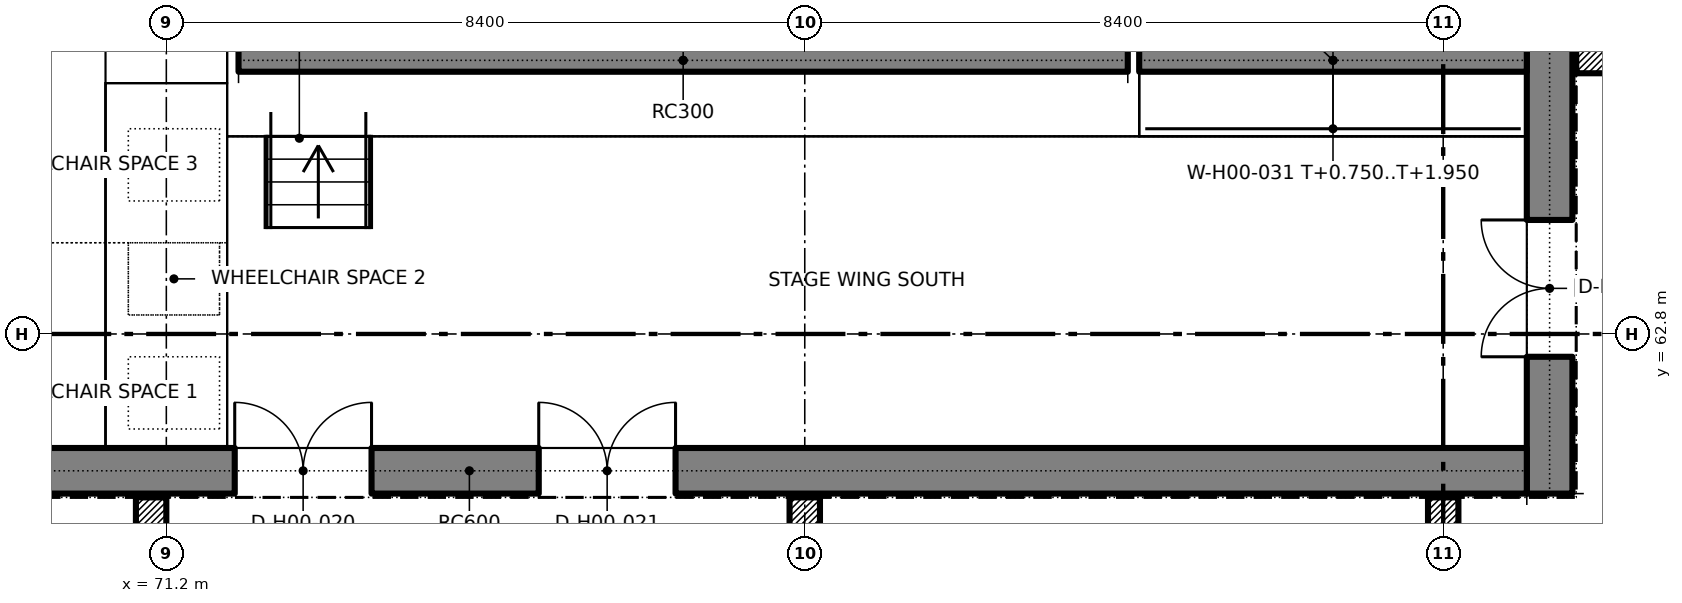
"""IFC4 building model, lengths in metres.
Left out: names, types, materials, properties, quantities, classifications, styles, units other than length and angle.
Written with IfcOpenShell. Run it as: python <this file> out.ifc"""

import sys

from ifc_helpers import new_model, si_unit, direction, frame, frame_2d, origin, origin_2d, place, context, subcontext, project, spatial, polyline, rectangle, outline, extrude, element, fill, save


model = new_model("IFC4")
c1 = context("Model", 3, precision=1e-05, world=origin(), true_north=direction((0.0, 1.0)))
c2 = subcontext(c1, "Body", "Model", "MODEL_VIEW")
j1 = project(units=[si_unit("LENGTHUNIT", "METRE"), si_unit("PLANEANGLEUNIT", "RADIAN")], contexts=[c1])
p1 = place(None, origin())
s1 = spatial("IfcSite", under=j1, at=p1, CompositionType="ELEMENT")
p2 = place(p1, origin())
s2 = spatial("IfcBuilding", under=s1, at=p2, CompositionType="ELEMENT")
p3 = place(p2, origin())
s3 = spatial("IfcBuildingStorey", under=s2, at=p3, CompositionType="ELEMENT", Elevation=0.0)
p4 = place(p3, frame((89.4, 60.7, 0.0), z_axis=(0.0, 0.0, 1.0), x_axis=(0.0, 1.0, 0.0)))
e1 = element("IfcWall", 1, at=p4, inside=s3, PredefinedType="SOLIDWALL", context=c2, shape_type="SweptSolid", body=[
    extrude(rectangle(XDim=29.4, YDim=0.6, at=frame_2d((14.7, 0.0))), origin(), (0.0, 0.0, 1.0), 5.4),
])
p5 = place(p4, frame((1.8, 0.0, 0.0)))
e2 = element("IfcOpeningElement", 2, at=p5, cuts=e1, PredefinedType="OPENING", context=c2, shape_type="SweptSolid", body=[
    extrude(rectangle(XDim=1.8, YDim=2.1, at=frame_2d((0.9, 1.05))), frame((0.0, 0.31, 0.0), z_axis=(0.0, -1.0, 0.0), x_axis=(1.0, 0.0, 0.0)), (0.0, 0.0, 1.0), 0.62),
])
p6 = place(p4, frame((25.8, 0.0, 0.0)))
e3 = element("IfcOpeningElement", 3, at=p6, cuts=e1, PredefinedType="OPENING", context=c2, shape_type="SweptSolid", body=[
    extrude(rectangle(XDim=1.8, YDim=2.1, at=frame_2d((0.9, 1.05))), frame((0.0, 0.31, 0.0), z_axis=(0.0, -1.0, 0.0), x_axis=(1.0, 0.0, 0.0)), (0.0, 0.0, 1.0), 0.62),
])
p7 = place(p3, frame((36.5, 61.0, 0.0), z_axis=(0.0, 0.0, 1.0), x_axis=(1.0, 0.0, 0.0)))
e4 = element("IfcWall", 4, at=p7, inside=s3, PredefinedType="SOLIDWALL", context=c2, shape_type="SweptSolid", body=[
    extrude(rectangle(XDim=52.6, YDim=0.6, at=frame_2d((26.3, 0.0))), origin(), (0.0, 0.0, 1.0), 5.4),
])
p8 = place(p7, frame((35.6, 0.0, 0.0)))
e5 = element("IfcOpeningElement", 5, at=p8, cuts=e4, PredefinedType="OPENING", context=c2, shape_type="SweptSolid", body=[
    extrude(rectangle(XDim=1.8, YDim=2.1, at=frame_2d((0.9, 1.05))), frame((0.0, 0.31, 0.0), z_axis=(0.0, -1.0, 0.0), x_axis=(1.0, 0.0, 0.0)), (0.0, 0.0, 1.0), 0.62),
])
p9 = place(p7, frame((39.6, 0.0, 0.0)))
e6 = element("IfcOpeningElement", 6, at=p9, cuts=e4, PredefinedType="OPENING", context=c2, shape_type="SweptSolid", body=[
    extrude(rectangle(XDim=1.8, YDim=2.1, at=frame_2d((0.9, 1.05))), frame((0.0, 0.31, 0.0), z_axis=(0.0, -1.0, 0.0), x_axis=(1.0, 0.0, 0.0)), (0.0, 0.0, 1.0), 0.62),
])
for number, where, z_axis, x_axis in (
    (7, (71.0, 60.45, 0.0), (0.0, 0.0, 1.0), (1.0, 0.0, 0.0)),
    (8, (79.6, 60.45, 0.0), (0.0, 0.0, 1.0), (1.0, 0.0, 0.0)),
    (9, (88.0, 60.45, 0.0), (0.0, 0.0, 1.0), (1.0, 0.0, 0.0)),
    (10, (89.95, 66.43, 0.0), (0.0, 0.0, 1.0), (1.0, 0.0, 0.0)),
):
    element("IfcColumn", number, at=place(p3, frame(where, z_axis=z_axis, x_axis=x_axis)), inside=s3, PredefinedType="COLUMN", context=c2, shape_type="SweptSolid", body=[
        extrude(rectangle(XDim=0.4, YDim=0.4, at=origin_2d()), origin(), (0.0, 0.0, 1.0), 5.4),
    ])
p10 = place(p3, frame((72.15, 66.4, 0.0), z_axis=(0.0, 0.0, 1.0), x_axis=(1.0, 0.0, 0.0)))
e11 = element("IfcWall", 11, at=p10, inside=s3, PredefinedType="SOLIDWALL", context=c2, shape_type="SweptSolid", body=[
    extrude(rectangle(XDim=11.7, YDim=0.3, at=frame_2d((5.85, 0.0))), origin(), (0.0, 0.0, 1.0), 0.45),
])
p11 = place(p3, frame((84.0, 66.4, 0.0), z_axis=(0.0, 0.0, 1.0), x_axis=(1.0, 0.0, 0.0)))
e12 = element("IfcWall", 12, at=p11, inside=s3, PredefinedType="SOLIDWALL", context=c2, shape_type="SweptSolid", body=[
    extrude(outline(polyline([(0.0, 0.0), (5.1, 0.0), (5.1, 1.95), (0.0, 0.75), (0.0, 0.0)])), frame((0.0, 0.15, 0.0), z_axis=(0.0, -1.0, 0.0), x_axis=(1.0, 0.0, 0.0)), (0.0, 0.0, 1.0), 0.3),
])
p12 = place(p3, frame((89.4, 60.7, -0.3), z_axis=(0.0, 0.0, 1.0), x_axis=(0.0, 1.0, 0.0)))
e13 = element("IfcWall", 13, at=p12, inside=s3, PredefinedType="SOLIDWALL", context=c2, shape_type="SweptSolid", body=[
    extrude(rectangle(XDim=1.27, YDim=0.6, at=frame_2d((0.635, 0.0))), origin(), (0.0, 0.0, 1.0), 0.3),
])
p13 = place(p3, frame((89.4, 65.01, -0.3), z_axis=(0.0, 0.0, 1.0), x_axis=(0.0, 1.0, 0.0)))
e14 = element("IfcWall", 14, at=p13, inside=s3, PredefinedType="SOLIDWALL", context=c2, shape_type="SweptSolid", body=[
    extrude(rectangle(XDim=2.84, YDim=0.6, at=frame_2d((1.42, 0.0))), origin(), (0.0, 0.0, 1.0), 0.3),
])
for number, where, z_axis, x_axis in (
    (15, (89.4, 61.97, -0.3), (0.0, 0.0, 1.0), (0.0, 1.0, 0.0)),
    (16, (69.48, 61.0, -0.3), (0.0, 0.0, 1.0), (1.0, 0.0, 0.0)),
    (17, (78.08, 61.0, -0.3), (0.0, 0.0, 1.0), (1.0, 0.0, 0.0)),
):
    element("IfcWall", number, at=place(p3, frame(where, z_axis=z_axis, x_axis=x_axis)), inside=s3, PredefinedType="SOLIDWALL", context=c2, shape_type="SweptSolid", body=[
        extrude(rectangle(XDim=3.04, YDim=0.6, at=frame_2d((1.52, 0.0))), origin(), (0.0, 0.0, 1.0), 0.3),
    ])
p14 = place(p3, frame((86.48, 61.0, -0.3), z_axis=(0.0, 0.0, 1.0), x_axis=(1.0, 0.0, 0.0)))
e18 = element("IfcWall", 18, at=p14, inside=s3, PredefinedType="SOLIDWALL", context=c2, shape_type="SweptSolid", body=[
    extrude(rectangle(XDim=2.62, YDim=0.6, at=frame_2d((1.31, 0.0))), origin(), (0.0, 0.0, 1.0), 0.3),
])
p15 = place(p3, frame((72.52, 61.0, -0.3), z_axis=(0.0, 0.0, 1.0), x_axis=(1.0, 0.0, 0.0)))
e19 = element("IfcWall", 19, at=p15, inside=s3, PredefinedType="SOLIDWALL", context=c2, shape_type="SweptSolid", body=[
    extrude(rectangle(XDim=5.56, YDim=0.6, at=frame_2d((2.78, 0.0))), origin(), (0.0, 0.0, 1.0), 0.3),
])
p16 = place(p3, frame((81.12, 61.0, -0.3), z_axis=(0.0, 0.0, 1.0), x_axis=(1.0, 0.0, 0.0)))
e20 = element("IfcWall", 20, at=p16, inside=s3, PredefinedType="SOLIDWALL", context=c2, shape_type="SweptSolid", body=[
    extrude(rectangle(XDim=5.36, YDim=0.6, at=frame_2d((2.68, 0.0))), origin(), (0.0, 0.0, 1.0), 0.3),
])
p17 = place(p3, frame((72.15, 66.4, -0.805), z_axis=(0.0, 0.0, 1.0), x_axis=(1.0, 0.0, 0.0)))
e21 = element("IfcWall", 21, at=p17, inside=s3, PredefinedType="SOLIDWALL", context=c2, shape_type="SweptSolid", body=[
    extrude(rectangle(XDim=0.47, YDim=0.3, at=frame_2d((0.235, 0.0))), origin(), (0.0, 0.0, 1.0), 0.805),
])
p18 = place(p3, frame((72.62, 66.4, -0.3), z_axis=(0.0, 0.0, 1.0), x_axis=(1.0, 0.0, 0.0)))
e22 = element("IfcWall", 22, at=p18, inside=s3, PredefinedType="SOLIDWALL", context=c2, shape_type="SweptSolid", body=[
    extrude(rectangle(XDim=11.4, YDim=0.3, at=frame_2d((5.7, 0.0))), origin(), (0.0, 0.0, 1.0), 0.3),
])
p19 = place(p3, frame((88.43, 66.4, -0.3), z_axis=(0.0, 0.0, 1.0), x_axis=(1.0, 0.0, 0.0)))
e23 = element("IfcWall", 23, at=p19, inside=s3, PredefinedType="SOLIDWALL", context=c2, shape_type="SweptSolid", body=[
    extrude(rectangle(XDim=0.67, YDim=0.3, at=frame_2d((0.335, 0.0))), origin(), (0.0, 0.0, 1.0), 0.3),
])
p20 = place(p3, frame((84.02, 66.4, -0.3), z_axis=(0.0, 0.0, 1.0), x_axis=(1.0, 0.0, 0.0)))
e24 = element("IfcWall", 24, at=p20, inside=s3, PredefinedType="SOLIDWALL", context=c2, shape_type="SweptSolid", body=[
    extrude(rectangle(XDim=4.41, YDim=0.3, at=frame_2d((2.205, 0.0))), origin(), (0.0, 0.0, 1.0), 0.3),
])
p21 = place(p8, origin())
e25 = element("IfcDoor", 25, at=p21, inside=s3, OperationType="DOUBLE_DOOR_SINGLE_SWING", PredefinedType="DOOR", context=c2, shape_type="SweptSolid", body=[
    extrude(rectangle(XDim=1.8, YDim=2.1, at=frame_2d((0.9, 1.05))), frame((0.0, 0.025, 0.0), z_axis=(0.0, -1.0, 0.0), x_axis=(1.0, 0.0, 0.0)), (0.0, 0.0, 1.0), 0.05),
])
fill(e5, e25)
p22 = place(p9, origin())
e26 = element("IfcDoor", 26, at=p22, inside=s3, OperationType="DOUBLE_DOOR_SINGLE_SWING", PredefinedType="DOOR", context=c2, shape_type="SweptSolid", body=[
    extrude(rectangle(XDim=1.8, YDim=2.1, at=frame_2d((0.9, 1.05))), frame((0.0, 0.025, 0.0), z_axis=(0.0, -1.0, 0.0), x_axis=(1.0, 0.0, 0.0)), (0.0, 0.0, 1.0), 0.05),
])
fill(e6, e26)
p23 = place(p5, origin())
e27 = element("IfcDoor", 27, at=p23, inside=s3, OperationType="DOUBLE_DOOR_SINGLE_SWING", PredefinedType="DOOR", context=c2, shape_type="SweptSolid", body=[
    extrude(rectangle(XDim=1.8, YDim=2.1, at=frame_2d((0.9, 1.05))), frame((0.0, 0.025, 0.0), z_axis=(0.0, -1.0, 0.0), x_axis=(1.0, 0.0, 0.0)), (0.0, 0.0, 1.0), 0.05),
])
fill(e2, e27)
save(model, sys.argv[1])
